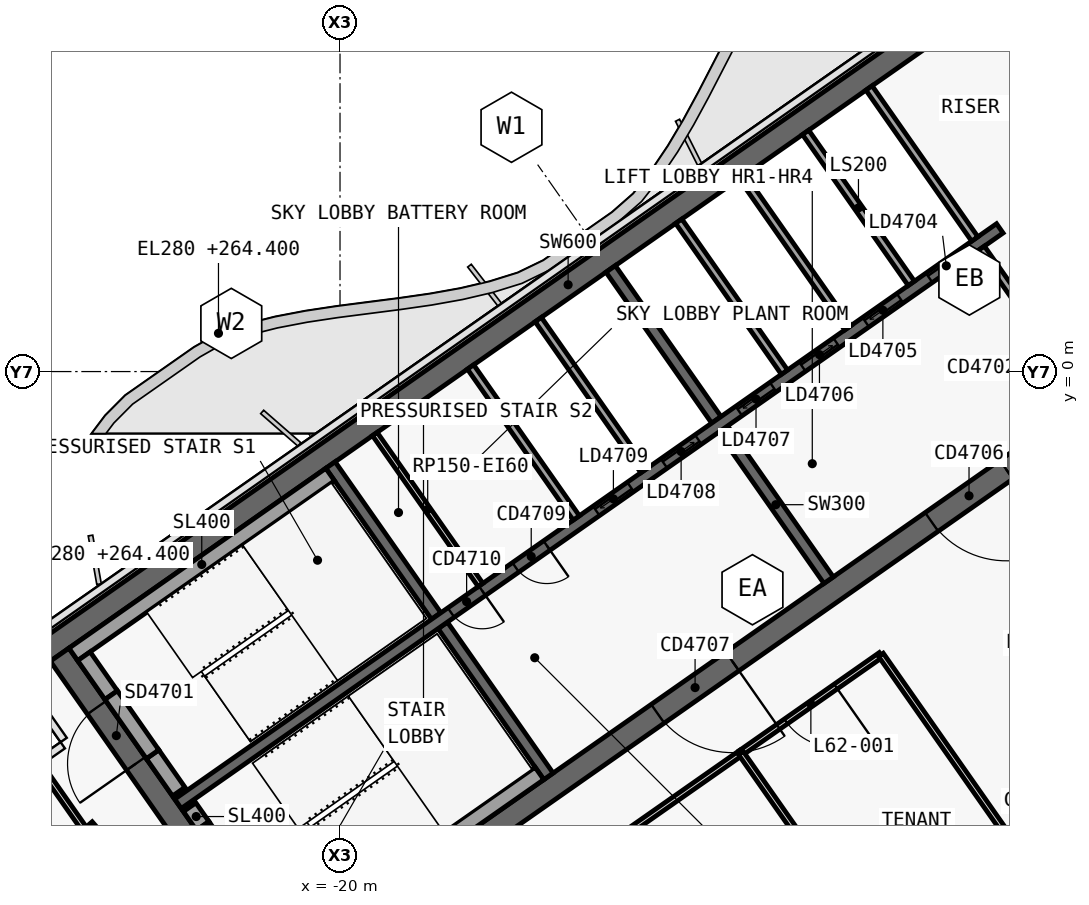
"""IFC4 building model, lengths in metres.
Left out: names, types, materials, properties, quantities, classifications, styles, units other than length and angle.
Written with IfcOpenShell. Run it as: python <this file> out.ifc"""

import sys

from ifc_helpers import new_model, si_unit, direction, frame, frame_2d, origin, place, context, subcontext, project, spatial, polyline, rectangle, outline, extrude, element, fill, save


model = new_model("IFC4")
c1 = context("Model", 3, precision=1e-05, world=origin(), true_north=direction((0.0, 1.0)))
c2 = subcontext(c1, "Body", "Model", "MODEL_VIEW")
j1 = project(units=[si_unit("LENGTHUNIT", "METRE"), si_unit("PLANEANGLEUNIT", "RADIAN")], contexts=[c1])
p1 = place(None, origin())
s1 = spatial("IfcSite", under=j1, at=p1, CompositionType="ELEMENT")
p2 = place(p1, origin())
s2 = spatial("IfcBuilding", under=s1, at=p2, CompositionType="ELEMENT")
p3 = place(p2, frame((0.0, 0.0, 264.4)))
s3 = spatial("IfcBuildingStorey", under=s2, at=p3, CompositionType="ELEMENT", Elevation=264.4)
p4 = place(p3, frame((-0.028, 12.066, 0.0), z_axis=(0.0, 0.0, 1.0), x_axis=(-0.819151382952, -0.573577380837, 0.0)))
e1 = element("IfcWall", 1, at=p4, inside=s3, PredefinedType="SHEAR", context=c2, shape_type="SweptSolid", body=[
    extrude(outline(polyline([(33.898, 0.3), (0.42, 0.3), (0.0, -0.3), (33.898, -0.3), (33.898, 0.3)])), origin(), (0.0, 0.0, 1.0), 3.9),
])
p5 = place(p3, frame((-0.028, -0.874, 0.0), z_axis=(0.0, 0.0, 1.0), x_axis=(-0.819150035022, -0.573579305871, 0.0)))
e2 = element("IfcWall", 2, at=p5, inside=s3, PredefinedType="SHEAR", context=c2, shape_type="SweptSolid", body=[
    extrude(outline(polyline([(26.476, 0.3), (0.42, 0.3), (0.0, -0.3), (26.476, -0.3), (26.476, 0.3)])), origin(), (0.0, 0.0, 1.0), 3.9),
])
p6 = place(p5, frame((2.976, 0.0, 0.0)))
e3 = element("IfcOpeningElement", 3, at=p6, cuts=e2, PredefinedType="OPENING", context=c2, shape_type="SweptSolid", body=[
    extrude(rectangle(XDim=2.4, YDim=2.1, at=frame_2d((1.2, 1.05))), frame((0.0, 0.31, 0.0), z_axis=(0.0, -1.0, 0.0), x_axis=(1.0, 0.0, 0.0)), (0.0, 0.0, 1.0), 0.62),
])
p7 = place(p5, frame((11.776, 0.0, 0.0)))
e4 = element("IfcOpeningElement", 4, at=p7, cuts=e2, PredefinedType="OPENING", context=c2, shape_type="SweptSolid", body=[
    extrude(rectangle(XDim=2.4, YDim=2.1, at=frame_2d((1.2, 1.05))), frame((0.0, 0.31, 0.0), z_axis=(0.0, -1.0, 0.0), x_axis=(1.0, 0.0, 0.0)), (0.0, 0.0, 1.0), 0.62),
])
p8 = place(p3, frame((-21.642, -15.642, 0.0), z_axis=(0.0, 0.0, 1.0), x_axis=(-0.573586866468, 0.819144740944, 0.0)))
e5 = element("IfcWall", 5, at=p8, inside=s3, PredefinedType="SHEAR", context=c2, shape_type="SweptSolid", body=[
    extrude(outline(polyline([(0.0, 0.3), (0.0, -0.3), (10.0, -0.3), (10.0, 0.3), (0.0, 0.3)])), origin(), (0.0, 0.0, 1.0), 3.9),
])
p9 = place(p8, frame((6.5, 0.0, 0.0)))
e6 = element("IfcOpeningElement", 6, at=p9, cuts=e5, PredefinedType="OPENING", context=c2, shape_type="SweptSolid", body=[
    extrude(rectangle(XDim=1.8, YDim=2.1, at=frame_2d((0.9, 1.05))), frame((0.0, 0.31, 0.0), z_axis=(0.0, -1.0, 0.0), x_axis=(1.0, 0.0, 0.0)), (0.0, 0.0, 1.0), 0.62),
])
p10 = place(p8, frame((2.3, 0.0, 0.0)))
e7 = element("IfcOpeningElement", 7, at=p10, cuts=e5, PredefinedType="OPENING", context=c2, shape_type="SweptSolid", body=[
    extrude(rectangle(XDim=1.8, YDim=2.1, at=frame_2d((0.9, 1.05))), frame((0.0, 0.31, 0.0), z_axis=(0.0, -1.0, 0.0), x_axis=(1.0, 0.0, 0.0)), (0.0, 0.0, 1.0), 0.62),
])
p11 = place(p3, frame((-7.143, -5.49, 0.0), z_axis=(0.0, 0.0, 1.0), x_axis=(-0.573617744349, 0.819123118565, 0.0)))
e8 = element("IfcWall", 8, at=p11, inside=s3, PredefinedType="SHEAR", context=c2, shape_type="SweptSolid", body=[
    extrude(outline(polyline([(4.85, 0.15), (0.0, 0.15), (0.0, -0.15), (4.85, -0.15), (4.85, 0.15)])), origin(), (0.0, 0.0, 1.0), 3.9),
])
p12 = place(p3, frame((-10.097, -1.271, 0.0), z_axis=(0.0, 0.0, 1.0), x_axis=(-0.573560315113, 0.819163332265, 0.0)))
e9 = element("IfcWall", 9, at=p12, inside=s3, PredefinedType="SHEAR", context=c2, shape_type="SweptSolid", body=[
    extrude(outline(polyline([(4.85, -0.15), (4.85, 0.15), (0.0, 0.15), (0.0, -0.15), (4.85, -0.15)])), origin(), (0.0, 0.0, 1.0), 3.9),
])
p13 = place(p3, frame((-14.515, -10.652, 0.0), z_axis=(0.0, 0.0, 1.0), x_axis=(-0.573560315113, 0.819163332265, 0.0)))
e10 = element("IfcWall", 10, at=p13, inside=s3, PredefinedType="SHEAR", context=c2, shape_type="SweptSolid", body=[
    extrude(outline(polyline([(4.85, 0.15), (0.0, 0.15), (0.0, -0.15), (4.85, -0.15), (4.85, 0.15)])), origin(), (0.0, 0.0, 1.0), 3.9),
])
p14 = place(p3, frame((-17.469, -6.433, 0.0), z_axis=(0.0, 0.0, 1.0), x_axis=(-0.573594092424, 0.81913968109, 0.0)))
e11 = element("IfcWall", 11, at=p14, inside=s3, PredefinedType="SHEAR", context=c2, shape_type="SweptSolid", body=[
    extrude(outline(polyline([(4.85, -0.15), (4.85, 0.15), (0.0, 0.15), (0.0, -0.15), (4.85, -0.15)])), origin(), (0.0, 0.0, 1.0), 3.9),
])
p15 = place(p3, frame((-2.638, 3.768, 0.0), z_axis=(0.0, 0.0, 1.0), x_axis=(-0.819155014212, -0.573572194837, 0.0)))
e12 = element("IfcWall", 12, at=p15, inside=s3, PredefinedType="SHEAR", context=c2, shape_type="SweptSolid", body=[
    extrude(outline(polyline([(26.4, 0.15), (0.0, 0.15), (0.0, -0.15), (26.4, -0.15), (26.4, 0.15)])), origin(), (0.0, 0.0, 1.0), 3.9),
])
p16 = place(p15, frame((1.169, 0.0, 0.0)))
e13 = element("IfcOpeningElement", 13, at=p16, cuts=e12, PredefinedType="OPENING", context=c2, shape_type="SweptSolid", body=[
    extrude(rectangle(XDim=1.1, YDim=2.1, at=frame_2d((0.55, 1.05))), frame((0.0, 0.16, 0.0), z_axis=(0.0, -1.0, 0.0), x_axis=(1.0, 0.0, 0.0)), (0.0, 0.0, 1.0), 0.32),
])
p17 = place(p15, frame((3.206, 0.0, 0.0)))
e14 = element("IfcOpeningElement", 14, at=p17, cuts=e12, PredefinedType="OPENING", context=c2, shape_type="SweptSolid", body=[
    extrude(rectangle(XDim=1.1, YDim=2.1, at=frame_2d((0.55, 1.05))), frame((0.0, 0.16, 0.0), z_axis=(0.0, -1.0, 0.0), x_axis=(1.0, 0.0, 0.0)), (0.0, 0.0, 1.0), 0.32),
])
p18 = place(p15, frame((5.244, 0.0, 0.0)))
e15 = element("IfcOpeningElement", 15, at=p18, cuts=e12, PredefinedType="OPENING", context=c2, shape_type="SweptSolid", body=[
    extrude(rectangle(XDim=1.1, YDim=2.1, at=frame_2d((0.55, 1.05))), frame((0.0, 0.16, 0.0), z_axis=(0.0, -1.0, 0.0), x_axis=(1.0, 0.0, 0.0)), (0.0, 0.0, 1.0), 0.32),
])
p19 = place(p15, frame((7.281, 0.0, 0.0)))
e16 = element("IfcOpeningElement", 16, at=p19, cuts=e12, PredefinedType="OPENING", context=c2, shape_type="SweptSolid", body=[
    extrude(rectangle(XDim=1.1, YDim=2.1, at=frame_2d((0.55, 1.05))), frame((0.0, 0.16, 0.0), z_axis=(0.0, -1.0, 0.0), x_axis=(1.0, 0.0, 0.0)), (0.0, 0.0, 1.0), 0.32),
])
p20 = place(p15, frame((9.688, 0.0, 0.0)))
e17 = element("IfcOpeningElement", 17, at=p20, cuts=e12, PredefinedType="OPENING", context=c2, shape_type="SweptSolid", body=[
    extrude(rectangle(XDim=1.1, YDim=2.1, at=frame_2d((0.55, 1.05))), frame((0.0, 0.16, 0.0), z_axis=(0.0, -1.0, 0.0), x_axis=(1.0, 0.0, 0.0)), (0.0, 0.0, 1.0), 0.32),
])
p21 = place(p15, frame((11.863, 0.0, 0.0)))
e18 = element("IfcOpeningElement", 18, at=p21, cuts=e12, PredefinedType="OPENING", context=c2, shape_type="SweptSolid", body=[
    extrude(rectangle(XDim=1.1, YDim=2.1, at=frame_2d((0.55, 1.05))), frame((0.0, 0.16, 0.0), z_axis=(0.0, -1.0, 0.0), x_axis=(1.0, 0.0, 0.0)), (0.0, 0.0, 1.0), 0.32),
])
p22 = place(p15, frame((14.552, 0.0, 0.0)))
e19 = element("IfcOpeningElement", 19, at=p22, cuts=e12, PredefinedType="OPENING", context=c2, shape_type="SweptSolid", body=[
    extrude(rectangle(XDim=1.0, YDim=2.1, at=frame_2d((0.5, 1.05))), frame((0.0, 0.16, 0.0), z_axis=(0.0, -1.0, 0.0), x_axis=(1.0, 0.0, 0.0)), (0.0, 0.0, 1.0), 0.32),
])
p23 = place(p15, frame((16.627, 0.0, 0.0)))
e20 = element("IfcOpeningElement", 20, at=p23, cuts=e12, PredefinedType="OPENING", context=c2, shape_type="SweptSolid", body=[
    extrude(rectangle(XDim=1.0, YDim=2.1, at=frame_2d((0.5, 1.05))), frame((0.0, 0.16, 0.0), z_axis=(0.0, -1.0, 0.0), x_axis=(1.0, 0.0, 0.0)), (0.0, 0.0, 1.0), 0.32),
])
p24 = place(p3, frame((-4.967, 2.321, 0.0), z_axis=(0.0, 0.0, 1.0), x_axis=(-0.573594092424, 0.81913968109, 0.0)))
e21 = element("IfcWall", 21, at=p24, inside=s3, PredefinedType="SOLIDWALL", context=c2, shape_type="SweptSolid", body=[
    extrude(rectangle(XDim=4.85, YDim=0.2, at=frame_2d((2.425, 0.0))), origin(), (0.0, 0.0, 1.0), 3.9),
])
p25 = place(p3, frame((-6.636, 1.152, 0.0), z_axis=(0.0, 0.0, 1.0), x_axis=(-0.573560315113, 0.819163332265, 0.0)))
e22 = element("IfcWall", 22, at=p25, inside=s3, PredefinedType="SOLIDWALL", context=c2, shape_type="SweptSolid", body=[
    extrude(rectangle(XDim=4.85, YDim=0.2, at=frame_2d((2.425, 0.0))), origin(), (0.0, 0.0, 1.0), 3.9),
])
p26 = place(p3, frame((-8.305, -0.017, 0.0), z_axis=(0.0, 0.0, 1.0), x_axis=(-0.573594092424, 0.81913968109, 0.0)))
e23 = element("IfcWall", 23, at=p26, inside=s3, PredefinedType="SOLIDWALL", context=c2, shape_type="SweptSolid", body=[
    extrude(rectangle(XDim=4.85, YDim=0.2, at=frame_2d((2.425, 0.0))), origin(), (0.0, 0.0, 1.0), 3.9),
])
p27 = place(p3, frame((-16.302, -5.616, 0.0), z_axis=(0.0, 0.0, 1.0), x_axis=(-0.573560315113, 0.819163332265, 0.0)))
e24 = element("IfcWall", 24, at=p27, inside=s3, PredefinedType="PARTITIONING", context=c2, shape_type="SweptSolid", body=[
    extrude(rectangle(XDim=4.85, YDim=0.15, at=frame_2d((2.425, 0.0))), origin(), (0.0, 0.0, 1.0), 3.62),
])
p28 = place(p3, frame((-12.001, -2.605, 0.0), z_axis=(0.0, 0.0, 1.0), x_axis=(-0.573560315113, 0.819163332265, 0.0)))
e25 = element("IfcWall", 25, at=p28, inside=s3, PredefinedType="SOLIDWALL", context=c2, shape_type="SweptSolid", body=[
    extrude(rectangle(XDim=4.85, YDim=0.2, at=frame_2d((2.425, 0.0))), origin(), (0.0, 0.0, 1.0), 3.9),
])
p29 = place(p3, frame((-13.783, -3.852, 0.0), z_axis=(0.0, 0.0, 1.0), x_axis=(-0.573594092424, 0.81913968109, 0.0)))
e26 = element("IfcWall", 26, at=p29, inside=s3, PredefinedType="SOLIDWALL", context=c2, shape_type="SweptSolid", body=[
    extrude(rectangle(XDim=4.85, YDim=0.2, at=frame_2d((2.425, 0.0))), origin(), (0.0, 0.0, 1.0), 3.9),
])
p30 = place(p3, frame((-20.259, -2.71, 0.0), z_axis=(0.0, 0.0, 1.0), x_axis=(-0.81914849389, -0.573581506813, 0.0)))
e27 = element("IfcWall", 27, at=p30, inside=s3, PredefinedType="SOLIDWALL", context=c2, shape_type="SweptSolid", body=[
    extrude(rectangle(XDim=8.25, YDim=0.4, at=frame_2d((4.125, 0.0))), origin(), (0.0, 0.0, 1.0), 3.62),
])
p31 = place(p3, frame((-24.244, -11.055, 0.0), z_axis=(0.0, 0.0, 1.0), x_axis=(-0.573571582932, 0.819155442668, 0.0)))
e28 = element("IfcWall", 28, at=p31, inside=s3, PredefinedType="SOLIDWALL", context=c2, shape_type="SweptSolid", body=[
    extrude(rectangle(XDim=1.2, YDim=0.4, at=frame_2d((0.6, 0.0))), origin(), (0.0, 0.0, 1.0), 3.62),
])
p32 = place(p3, frame((-26.022, -8.515, 0.0), z_axis=(0.0, 0.0, 1.0), x_axis=(-0.573619628835, 0.819121798889, 0.0)))
e29 = element("IfcWall", 29, at=p32, inside=s3, PredefinedType="SOLIDWALL", context=c2, shape_type="SweptSolid", body=[
    extrude(rectangle(XDim=1.25, YDim=0.4, at=frame_2d((0.625, 0.0))), origin(), (0.0, 0.0, 1.0), 3.62),
])
p33 = place(p3, frame((-24.932, -10.072, 2.15), z_axis=(0.0, 0.0, 1.0), x_axis=(-0.573591692345, 0.819141361715, 0.0)))
e30 = element("IfcWall", 30, at=p33, inside=s3, PredefinedType="SOLIDWALL", context=c2, shape_type="SweptSolid", body=[
    extrude(rectangle(XDim=1.9, YDim=0.4, at=frame_2d((0.95, 0.0))), origin(), (0.0, 0.0, 1.0), 1.47),
])
p34 = place(p3, frame((-14.753, -10.574, 0.0), z_axis=(0.0, 0.0, 1.0), x_axis=(-0.819158229677, -0.573567602601, 0.0)))
e31 = element("IfcWall", 31, at=p34, inside=s3, PredefinedType="SOLIDWALL", context=c2, shape_type="SweptSolid", body=[
    extrude(rectangle(XDim=8.25, YDim=0.4, at=frame_2d((4.125, 0.0))), origin(), (0.0, 0.0, 1.0), 3.62),
])
p35 = place(p3, frame((-23.613, -11.956, 0.0), z_axis=(0.0, 0.0, 1.0), x_axis=(-0.573435029941, 0.819251039936, 0.0)))
e32 = element("IfcWall", 32, at=p35, inside=s3, PredefinedType="SOLIDWALL", context=c2, shape_type="SweptSolid", body=[
    extrude(rectangle(XDim=0.6, YDim=0.4, at=frame_2d((0.3, 0.0))), origin(), (0.0, 0.0, 1.0), 3.62),
])
p36 = place(p3, frame((-22.523, -13.512, 2.15), z_axis=(0.0, 0.0, 1.0), x_axis=(-0.573591692345, 0.819141361715, 0.0)))
e33 = element("IfcWall", 33, at=p36, inside=s3, PredefinedType="SOLIDWALL", context=c2, shape_type="SweptSolid", body=[
    extrude(rectangle(XDim=1.9, YDim=0.4, at=frame_2d((0.95, 0.0))), origin(), (0.0, 0.0, 1.0), 1.47),
])
p37 = place(p3, frame((-0.344, -0.729, 0.0), z_axis=(0.0, 0.0, 1.0), x_axis=(-0.573560315113, 0.819163332265, 0.0)))
e34 = element("IfcWall", 34, at=p37, inside=s3, PredefinedType="SOLIDWALL", context=c2, shape_type="SweptSolid", body=[
    extrude(rectangle(XDim=4.85, YDim=0.2, at=frame_2d((2.425, 0.0))), origin(), (0.0, 0.0, 1.0), 3.62),
])
p38 = place(p37, frame((0.55, 0.0, 0.0)))
e35 = element("IfcOpeningElement", 35, at=p38, cuts=e34, PredefinedType="OPENING", context=c2, shape_type="SweptSolid", body=[
    extrude(rectangle(XDim=0.9, YDim=2.1, at=frame_2d((0.45, 1.05))), frame((0.0, 0.11, 0.0), z_axis=(0.0, -1.0, 0.0), x_axis=(1.0, 0.0, 0.0)), (0.0, 0.0, 1.0), 0.22),
])
p39 = place(p3, frame((-3.298, 3.49, 0.0), z_axis=(0.0, 0.0, 1.0), x_axis=(-0.573560315113, 0.819163332265, 0.0)))
e36 = element("IfcWall", 36, at=p39, inside=s3, PredefinedType="SOLIDWALL", context=c2, shape_type="SweptSolid", body=[
    extrude(rectangle(XDim=4.85, YDim=0.2, at=frame_2d((2.425, 0.0))), origin(), (0.0, 0.0, 1.0), 3.62),
])
p40 = place(p3, frame((-5.766, -7.456, 0.0), z_axis=(0.0, 0.0, 1.0), x_axis=(-0.819142740634, -0.573589723117, 0.0)))
e37 = element("IfcWall", 37, at=p40, inside=s3, PredefinedType="PARTITIONING", context=c2, shape_type="SweptSolid", body=[
    extrude(rectangle(XDim=4.502, YDim=0.15, at=frame_2d((2.251, 0.0))), origin(), (0.0, 0.0, 1.0), 3.05),
])
p41 = place(p40, frame((1.451, 0.0, 0.0)))
e38 = element("IfcOpeningElement", 38, at=p41, cuts=e37, PredefinedType="OPENING", context=c2, shape_type="SweptSolid", body=[
    extrude(rectangle(XDim=1.6, YDim=2.1, at=frame_2d((0.8, 1.05))), frame((0.0, 0.085, 0.0), z_axis=(0.0, -1.0, 0.0), x_axis=(1.0, 0.0, 0.0)), (0.0, 0.0, 1.0), 0.17),
])
p42 = place(p3, frame((-9.451, -10.036, 0.0), z_axis=(0.0, 0.0, 1.0), x_axis=(-0.819164214721, -0.57355905478, 0.0)))
e39 = element("IfcWall", 39, at=p42, inside=s3, PredefinedType="PARTITIONING", context=c2, shape_type="SweptSolid", body=[
    extrude(rectangle(XDim=10.504, YDim=0.15, at=frame_2d((5.252, 0.0))), origin(), (0.0, 0.0, 1.0), 3.05),
])
p43 = place(p42, frame((4.452, 0.0, 0.0)))
e40 = element("IfcOpeningElement", 40, at=p43, cuts=e39, PredefinedType="OPENING", context=c2, shape_type="SweptSolid", body=[
    extrude(rectangle(XDim=1.6, YDim=2.1, at=frame_2d((0.8, 1.05))), frame((0.0, 0.085, 0.0), z_axis=(0.0, -1.0, 0.0), x_axis=(1.0, 0.0, 0.0)), (0.0, 0.0, 1.0), 0.17),
])
p44 = place(p3, frame((-1.849, -13.051, 0.0), z_axis=(0.0, 0.0, 1.0), x_axis=(-0.57357985571, 0.819149650018, 0.0)))
e41 = element("IfcWall", 41, at=p44, inside=s3, PredefinedType="PARTITIONING", context=c2, shape_type="SweptSolid", body=[
    extrude(rectangle(XDim=6.832, YDim=0.15, at=frame_2d((3.416, 0.0))), origin(), (0.0, 0.0, 1.0), 3.05),
])
p45 = place(p3, frame((-26.746, -12.014, 0.0), z_axis=(0.0, 0.0, 1.0), x_axis=(-0.573568836472, 0.819157365729, 0.0)))
e42 = element("IfcWall", 42, at=p45, inside=s3, PredefinedType="PARTITIONING", context=c2, shape_type="SweptSolid", body=[
    extrude(rectangle(XDim=2.0, YDim=0.15, at=frame_2d((1.0, 0.0))), origin(), (0.0, 0.0, 1.0), 3.05),
])
p46 = place(p3, frame((-22.284, -16.826, 0.0), z_axis=(0.0, 0.0, 1.0), x_axis=(-0.656758142177, 0.754101281449, 0.0)))
e43 = element("IfcWall", 43, at=p46, inside=s3, PredefinedType="PARTITIONING", context=c2, shape_type="SweptSolid", body=[
    extrude(rectangle(XDim=6.539, YDim=0.15, at=frame_2d((3.269, 0.0))), origin(), (0.0, 0.0, 1.0), 3.62),
])
p47 = place(p3, frame((-24.001, -18.026, 0.0), z_axis=(0.0, 0.0, 1.0), x_axis=(-0.573591492816, 0.819141501433, 0.0)))
e44 = element("IfcWall", 44, at=p47, inside=s3, PredefinedType="PARTITIONING", context=c2, shape_type="SweptSolid", body=[
    extrude(rectangle(XDim=8.5, YDim=0.15, at=frame_2d((4.25, 0.0))), origin(), (0.0, 0.0, 1.0), 3.05),
])
p48 = place(p3, frame((-7.444, -12.906, 0.0), z_axis=(0.0, 0.0, 1.0), x_axis=(-0.573555919535, 0.819166409935, 0.0)))
e45 = element("IfcWall", 45, at=p48, inside=s3, PredefinedType="PARTITIONING", context=c2, shape_type="SweptSolid", body=[
    extrude(rectangle(XDim=3.502, YDim=0.15, at=frame_2d((1.751, 0.0))), origin(), (0.0, 0.0, 1.0), 3.62),
])
p49 = place(p16, origin())
e46 = element("IfcDoor", 46, at=p49, inside=s3, OperationType="SLIDING_TO_LEFT", PredefinedType="DOOR", context=c2, shape_type="SweptSolid", body=[
    extrude(rectangle(XDim=1.1, YDim=2.1, at=frame_2d((0.55, 1.05))), frame((0.0, 0.025, 0.0), z_axis=(0.0, -1.0, 0.0), x_axis=(1.0, 0.0, 0.0)), (0.0, 0.0, 1.0), 0.05),
])
fill(e13, e46)
p50 = place(p17, origin())
e47 = element("IfcDoor", 47, at=p50, inside=s3, OperationType="SLIDING_TO_RIGHT", PredefinedType="DOOR", context=c2, shape_type="SweptSolid", body=[
    extrude(rectangle(XDim=1.1, YDim=2.1, at=frame_2d((0.55, 1.05))), frame((0.0, 0.025, 0.0), z_axis=(0.0, -1.0, 0.0), x_axis=(1.0, 0.0, 0.0)), (0.0, 0.0, 1.0), 0.05),
])
fill(e14, e47)
p51 = place(p18, origin())
e48 = element("IfcDoor", 48, at=p51, inside=s3, OperationType="SLIDING_TO_LEFT", PredefinedType="DOOR", context=c2, shape_type="SweptSolid", body=[
    extrude(rectangle(XDim=1.1, YDim=2.1, at=frame_2d((0.55, 1.05))), frame((0.0, 0.025, 0.0), z_axis=(0.0, -1.0, 0.0), x_axis=(1.0, 0.0, 0.0)), (0.0, 0.0, 1.0), 0.05),
])
fill(e15, e48)
p52 = place(p19, origin())
e49 = element("IfcDoor", 49, at=p52, inside=s3, OperationType="SLIDING_TO_RIGHT", PredefinedType="DOOR", context=c2, shape_type="SweptSolid", body=[
    extrude(rectangle(XDim=1.1, YDim=2.1, at=frame_2d((0.55, 1.05))), frame((0.0, 0.025, 0.0), z_axis=(0.0, -1.0, 0.0), x_axis=(1.0, 0.0, 0.0)), (0.0, 0.0, 1.0), 0.05),
])
fill(e16, e49)
p53 = place(p20, origin())
e50 = element("IfcDoor", 50, at=p53, inside=s3, OperationType="SLIDING_TO_LEFT", PredefinedType="DOOR", context=c2, shape_type="SweptSolid", body=[
    extrude(rectangle(XDim=1.1, YDim=2.1, at=frame_2d((0.55, 1.05))), frame((0.0, 0.025, 0.0), z_axis=(0.0, -1.0, 0.0), x_axis=(1.0, 0.0, 0.0)), (0.0, 0.0, 1.0), 0.05),
])
fill(e17, e50)
p54 = place(p21, origin())
e51 = element("IfcDoor", 51, at=p54, inside=s3, OperationType="SLIDING_TO_RIGHT", PredefinedType="DOOR", context=c2, shape_type="SweptSolid", body=[
    extrude(rectangle(XDim=1.1, YDim=2.1, at=frame_2d((0.55, 1.05))), frame((0.0, 0.025, 0.0), z_axis=(0.0, -1.0, 0.0), x_axis=(1.0, 0.0, 0.0)), (0.0, 0.0, 1.0), 0.05),
])
fill(e18, e51)
p55 = place(p22, origin())
e52 = element("IfcDoor", 52, at=p55, inside=s3, OperationType="SINGLE_SWING_RIGHT", PredefinedType="DOOR", context=c2, shape_type="SweptSolid", body=[
    extrude(rectangle(XDim=1.0, YDim=2.1, at=frame_2d((0.5, 1.05))), frame((0.0, 0.025, 0.0), z_axis=(0.0, -1.0, 0.0), x_axis=(1.0, 0.0, 0.0)), (0.0, 0.0, 1.0), 0.05),
])
fill(e19, e52)
p56 = place(p23, origin())
e53 = element("IfcDoor", 53, at=p56, inside=s3, OperationType="SINGLE_SWING_RIGHT", PredefinedType="DOOR", context=c2, shape_type="SweptSolid", body=[
    extrude(rectangle(XDim=1.0, YDim=2.1, at=frame_2d((0.5, 1.05))), frame((0.0, 0.025, 0.0), z_axis=(0.0, -1.0, 0.0), x_axis=(1.0, 0.0, 0.0)), (0.0, 0.0, 1.0), 0.05),
])
fill(e20, e53)
p57 = place(p6, origin())
e54 = element("IfcDoor", 54, at=p57, inside=s3, OperationType="DOUBLE_DOOR_SINGLE_SWING", PredefinedType="DOOR", context=c2, shape_type="SweptSolid", body=[
    extrude(rectangle(XDim=2.4, YDim=2.1, at=frame_2d((1.2, 1.05))), frame((0.0, 0.025, 0.0), z_axis=(0.0, -1.0, 0.0), x_axis=(1.0, 0.0, 0.0)), (0.0, 0.0, 1.0), 0.05),
])
fill(e3, e54)
p58 = place(p7, origin())
e55 = element("IfcDoor", 55, at=p58, inside=s3, OperationType="DOUBLE_DOOR_SINGLE_SWING", PredefinedType="DOOR", context=c2, shape_type="SweptSolid", body=[
    extrude(rectangle(XDim=2.4, YDim=2.1, at=frame_2d((1.2, 1.05))), frame((0.0, 0.025, 0.0), z_axis=(0.0, -1.0, 0.0), x_axis=(1.0, 0.0, 0.0)), (0.0, 0.0, 1.0), 0.05),
])
fill(e4, e55)
p59 = place(p9, origin())
e56 = element("IfcDoor", 56, at=p59, inside=s3, OperationType="DOUBLE_DOOR_SINGLE_SWING", PredefinedType="DOOR", context=c2, shape_type="SweptSolid", body=[
    extrude(rectangle(XDim=1.8, YDim=2.1, at=frame_2d((0.9, 1.05))), frame((0.0, 0.025, 0.0), z_axis=(0.0, -1.0, 0.0), x_axis=(1.0, 0.0, 0.0)), (0.0, 0.0, 1.0), 0.05),
])
fill(e6, e56)
p60 = place(p41, origin())
e57 = element("IfcDoor", 57, at=p60, inside=s3, OperationType="DOUBLE_DOOR_SINGLE_SWING", PredefinedType="DOOR", context=c2, shape_type="SweptSolid", body=[
    extrude(rectangle(XDim=1.6, YDim=2.1, at=frame_2d((0.8, 1.05))), frame((0.0, 0.025, 0.0), z_axis=(0.0, -1.0, 0.0), x_axis=(1.0, 0.0, 0.0)), (0.0, 0.0, 1.0), 0.05),
])
fill(e38, e57)
save(model, sys.argv[1])
